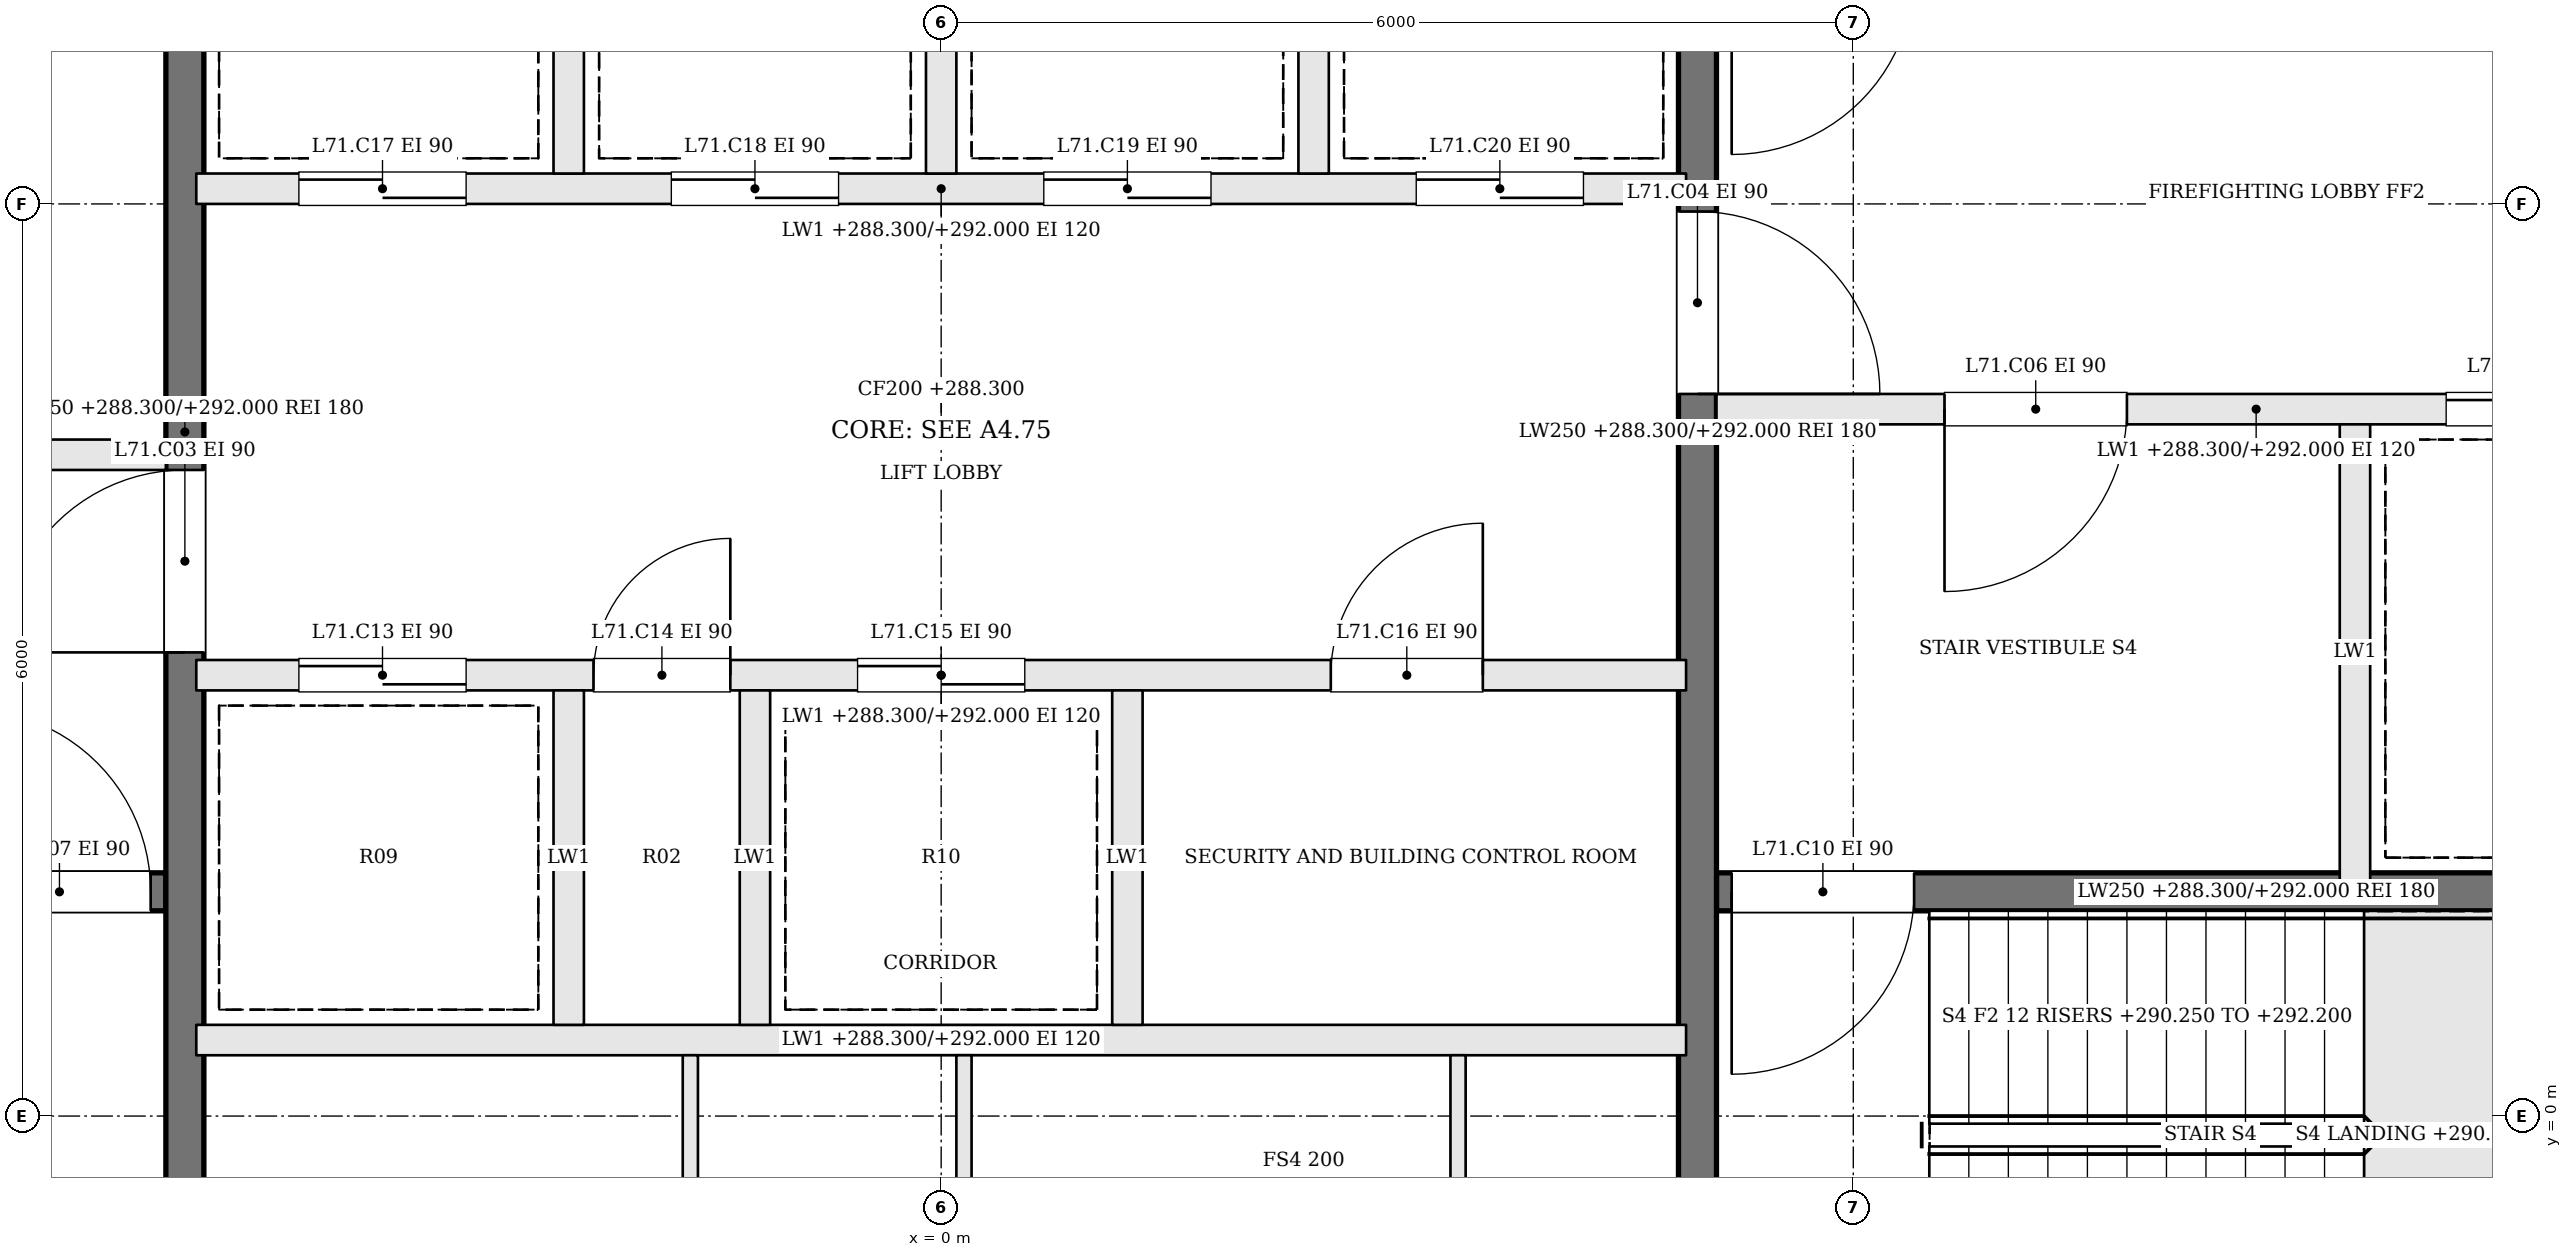
"""IFC4 building model, lengths in metres.
Left out: names, types, materials, properties, quantities, classifications, styles, units other than length and angle.
Written with IfcOpenShell. Run it as: python <this file> out.ifc"""

import sys

from ifc_helpers import new_model, si_unit, direction, frame, frame_2d, origin, place, context, subcontext, project, spatial, rectangle, extrude, element, fill, save


model = new_model("IFC4")
c1 = context("Model", 3, precision=1e-05, world=origin(), true_north=direction((0.0, 1.0)))
c2 = subcontext(c1, "Body", "Model", "MODEL_VIEW")
j1 = project(units=[si_unit("LENGTHUNIT", "METRE"), si_unit("PLANEANGLEUNIT", "RADIAN")], contexts=[c1])
p1 = place(None, origin())
s1 = spatial("IfcSite", under=j1, at=p1, CompositionType="ELEMENT")
p2 = place(p1, origin())
s2 = spatial("IfcBuilding", under=s1, at=p2, CompositionType="ELEMENT")
p3 = place(p2, frame((0.0, 0.0, 288.3)))
s3 = spatial("IfcBuildingStorey", under=s2, at=p3, CompositionType="ELEMENT", Elevation=288.3)
p4 = place(p3, frame((-12.2, 1.475, 0.0), z_axis=(0.0, 0.0, 1.0), x_axis=(1.0, 0.0, 0.0)))
e1 = element("IfcWall", 1, at=p4, inside=s3, PredefinedType="SOLIDWALL", context=c2, shape_type="SweptSolid", body=[
    extrude(rectangle(XDim=7.1, YDim=0.25, at=frame_2d((3.55, 0.0))), origin(), (0.0, 0.0, 1.0), 3.7),
])
p5 = place(p4, frame((5.8, 0.0, 0.0)))
e2 = element("IfcOpeningElement", 2, at=p5, cuts=e1, PredefinedType="OPENING", context=c2, shape_type="SweptSolid", body=[
    extrude(rectangle(XDim=1.2, YDim=2.1, at=frame_2d((0.6, 1.05))), frame((0.0, 0.135, 0.0), z_axis=(0.0, -1.0, 0.0), x_axis=(1.0, 0.0, 0.0)), (0.0, 0.0, 1.0), 0.27),
])
p6 = place(p3, frame((-12.2, 4.35, 0.0), z_axis=(0.0, 0.0, 1.0), x_axis=(1.0, 0.0, 0.0)))
e3 = element("IfcWall", 3, at=p6, inside=s3, PredefinedType="SOLIDWALL", context=c2, shape_type="SweptSolid", body=[
    extrude(rectangle(XDim=7.1, YDim=0.2, at=frame_2d((3.55, 0.0))), origin(), (0.0, 0.0, 1.0), 3.7),
])
p7 = place(p6, frame((4.4, 0.0, 0.0)))
e4 = element("IfcOpeningElement", 4, at=p7, cuts=e3, PredefinedType="OPENING", context=c2, shape_type="SweptSolid", body=[
    extrude(rectangle(XDim=1.2, YDim=2.1, at=frame_2d((0.6, 1.05))), frame((0.0, 0.11, 0.0), z_axis=(0.0, -1.0, 0.0), x_axis=(1.0, 0.0, 0.0)), (0.0, 0.0, 1.0), 0.22),
])
p8 = place(p6, frame((1.1, 0.0, 0.0)))
e5 = element("IfcOpeningElement", 5, at=p8, cuts=e3, PredefinedType="OPENING", context=c2, shape_type="SweptSolid", body=[
    extrude(rectangle(XDim=1.2, YDim=2.1, at=frame_2d((0.6, 1.05))), frame((0.0, 0.11, 0.0), z_axis=(0.0, -1.0, 0.0), x_axis=(1.0, 0.0, 0.0)), (0.0, 0.0, 1.0), 0.22),
])
p9 = place(p3, frame((12.2, 4.65, 0.0), z_axis=(0.0, 0.0, 1.0), x_axis=(-1.0, 0.0, 0.0)))
e6 = element("IfcWall", 6, at=p9, inside=s3, PredefinedType="SOLIDWALL", context=c2, shape_type="SweptSolid", body=[
    extrude(rectangle(XDim=7.1, YDim=0.2, at=frame_2d((3.55, 0.0))), origin(), (0.0, 0.0, 1.0), 3.7),
])
p10 = place(p9, frame((4.4, 0.0, 0.0)))
e7 = element("IfcOpeningElement", 7, at=p10, cuts=e6, PredefinedType="OPENING", context=c2, shape_type="SweptSolid", body=[
    extrude(rectangle(XDim=1.2, YDim=2.1, at=frame_2d((0.6, 1.05))), frame((0.0, 0.11, 0.0), z_axis=(0.0, -1.0, 0.0), x_axis=(1.0, 0.0, 0.0)), (0.0, 0.0, 1.0), 0.22),
])
p11 = place(p9, frame((1.1, 0.0, 0.0)))
e8 = element("IfcOpeningElement", 8, at=p11, cuts=e6, PredefinedType="OPENING", context=c2, shape_type="SweptSolid", body=[
    extrude(rectangle(XDim=1.2, YDim=2.1, at=frame_2d((0.6, 1.05))), frame((0.0, 0.11, 0.0), z_axis=(0.0, -1.0, 0.0), x_axis=(1.0, 0.0, 0.0)), (0.0, 0.0, 1.0), 0.22),
])
p12 = place(p3, frame((12.2, 1.475, 0.0), z_axis=(0.0, 0.0, 1.0), x_axis=(-1.0, 0.0, 0.0)))
e9 = element("IfcWall", 9, at=p12, inside=s3, PredefinedType="SOLIDWALL", context=c2, shape_type="SweptSolid", body=[
    extrude(rectangle(XDim=7.1, YDim=0.25, at=frame_2d((3.55, 0.0))), origin(), (0.0, 0.0, 1.0), 3.7),
])
p13 = place(p12, frame((5.8, 0.0, 0.0)))
e10 = element("IfcOpeningElement", 10, at=p13, cuts=e9, PredefinedType="OPENING", context=c2, shape_type="SweptSolid", body=[
    extrude(rectangle(XDim=1.2, YDim=2.1, at=frame_2d((0.6, 1.05))), frame((0.0, 0.135, 0.0), z_axis=(0.0, -1.0, 0.0), x_axis=(1.0, 0.0, 0.0)), (0.0, 0.0, 1.0), 0.27),
])
p14 = place(p3, frame((9.3, 4.55, 0.0), z_axis=(0.0, 0.0, 1.0), x_axis=(0.0, -1.0, 0.0)))
e11 = element("IfcWall", 11, at=p14, inside=s3, PredefinedType="SOLIDWALL", context=c2, shape_type="SweptSolid", body=[
    extrude(rectangle(XDim=3.0, YDim=0.2, at=frame_2d((1.5, 0.0))), origin(), (0.0, 0.0, 1.0), 3.7),
])
p15 = place(p3, frame((-4.975, -2.2, 0.0), z_axis=(0.0, 0.0, 1.0), x_axis=(0.0, 1.0, 0.0)))
e12 = element("IfcWall", 12, at=p15, inside=s3, PredefinedType="SOLIDWALL", context=c2, shape_type="SweptSolid", body=[
    extrude(rectangle(XDim=13.4, YDim=0.25, at=frame_2d((6.7, 0.0))), origin(), (0.0, 0.0, 1.0), 3.7),
])
p16 = place(p15, frame((5.25, 0.0, 0.0)))
e13 = element("IfcOpeningElement", 13, at=p16, cuts=e12, PredefinedType="OPENING", context=c2, shape_type="SweptSolid", body=[
    extrude(rectangle(XDim=1.2, YDim=2.1, at=frame_2d((0.6, 1.05))), frame((0.0, 0.135, 0.0), z_axis=(0.0, -1.0, 0.0), x_axis=(1.0, 0.0, 0.0)), (0.0, 0.0, 1.0), 0.27),
])
p17 = place(p3, frame((4.975, 11.2, 0.0), z_axis=(0.0, 0.0, 1.0), x_axis=(0.0, -1.0, 0.0)))
e14 = element("IfcWall", 14, at=p17, inside=s3, PredefinedType="SOLIDWALL", context=c2, shape_type="SweptSolid", body=[
    extrude(rectangle(XDim=13.4, YDim=0.25, at=frame_2d((6.7, 0.0))), origin(), (0.0, 0.0, 1.0), 3.7),
])
p18 = place(p17, frame((5.25, 0.0, 0.0)))
e15 = element("IfcOpeningElement", 15, at=p18, cuts=e14, PredefinedType="OPENING", context=c2, shape_type="SweptSolid", body=[
    extrude(rectangle(XDim=1.2, YDim=2.1, at=frame_2d((0.6, 1.05))), frame((0.0, 0.135, 0.0), z_axis=(0.0, -1.0, 0.0), x_axis=(1.0, 0.0, 0.0)), (0.0, 0.0, 1.0), 0.27),
])
p19 = place(p3, frame((-4.9, 0.5, 0.0), z_axis=(0.0, 0.0, 1.0), x_axis=(1.0, 0.0, 0.0)))
e16 = element("IfcWall", 16, at=p19, inside=s3, PredefinedType="SOLIDWALL", context=c2, shape_type="SweptSolid", body=[
    extrude(rectangle(XDim=9.8, YDim=0.2, at=frame_2d((4.9, 0.0))), origin(), (0.0, 0.0, 1.0), 3.7),
])
p20 = place(p3, frame((-4.9, 2.9, 0.0), z_axis=(0.0, 0.0, 1.0), x_axis=(1.0, 0.0, 0.0)))
e17 = element("IfcWall", 17, at=p20, inside=s3, PredefinedType="SOLIDWALL", context=c2, shape_type="SweptSolid", body=[
    extrude(rectangle(XDim=9.8, YDim=0.2, at=frame_2d((4.9, 0.0))), origin(), (0.0, 0.0, 1.0), 3.7),
])
p21 = place(p20, frame((0.675, 0.0, 0.0)))
e18 = element("IfcOpeningElement", 18, at=p21, cuts=e17, PredefinedType="OPENING", context=c2, shape_type="SweptSolid", body=[
    extrude(rectangle(XDim=1.1, YDim=2.1, at=frame_2d((0.55, 1.05))), frame((0.0, 0.11, 0.0), z_axis=(0.0, -1.0, 0.0), x_axis=(1.0, 0.0, 0.0)), (0.0, 0.0, 1.0), 0.22),
])
p22 = place(p20, frame((2.613, 0.0, 0.0)))
e19 = element("IfcOpeningElement", 19, at=p22, cuts=e17, PredefinedType="OPENING", context=c2, shape_type="SweptSolid", body=[
    extrude(rectangle(XDim=0.9, YDim=2.1, at=frame_2d((0.45, 1.05))), frame((0.0, 0.11, 0.0), z_axis=(0.0, -1.0, 0.0), x_axis=(1.0, 0.0, 0.0)), (0.0, 0.0, 1.0), 0.22),
])
p23 = place(p20, frame((4.35, 0.0, 0.0)))
e20 = element("IfcOpeningElement", 20, at=p23, cuts=e17, PredefinedType="OPENING", context=c2, shape_type="SweptSolid", body=[
    extrude(rectangle(XDim=1.1, YDim=2.1, at=frame_2d((0.55, 1.05))), frame((0.0, 0.11, 0.0), z_axis=(0.0, -1.0, 0.0), x_axis=(1.0, 0.0, 0.0)), (0.0, 0.0, 1.0), 0.22),
])
p24 = place(p20, frame((7.463, 0.0, 0.0)))
e21 = element("IfcOpeningElement", 21, at=p24, cuts=e17, PredefinedType="OPENING", context=c2, shape_type="SweptSolid", body=[
    extrude(rectangle(XDim=1.0, YDim=2.1, at=frame_2d((0.5, 1.05))), frame((0.0, 0.11, 0.0), z_axis=(0.0, -1.0, 0.0), x_axis=(1.0, 0.0, 0.0)), (0.0, 0.0, 1.0), 0.22),
])
p25 = place(p3, frame((-4.9, 6.1, 0.0), z_axis=(0.0, 0.0, 1.0), x_axis=(1.0, 0.0, 0.0)))
e22 = element("IfcWall", 22, at=p25, inside=s3, PredefinedType="SOLIDWALL", context=c2, shape_type="SweptSolid", body=[
    extrude(rectangle(XDim=9.8, YDim=0.2, at=frame_2d((4.9, 0.0))), origin(), (0.0, 0.0, 1.0), 3.7),
])
p26 = place(p25, frame((0.675, 0.0, 0.0)))
e23 = element("IfcOpeningElement", 23, at=p26, cuts=e22, PredefinedType="OPENING", context=c2, shape_type="SweptSolid", body=[
    extrude(rectangle(XDim=1.1, YDim=2.1, at=frame_2d((0.55, 1.05))), frame((0.0, 0.11, 0.0), z_axis=(0.0, -1.0, 0.0), x_axis=(1.0, 0.0, 0.0)), (0.0, 0.0, 1.0), 0.22),
])
p27 = place(p25, frame((3.125, 0.0, 0.0)))
e24 = element("IfcOpeningElement", 24, at=p27, cuts=e22, PredefinedType="OPENING", context=c2, shape_type="SweptSolid", body=[
    extrude(rectangle(XDim=1.1, YDim=2.1, at=frame_2d((0.55, 1.05))), frame((0.0, 0.11, 0.0), z_axis=(0.0, -1.0, 0.0), x_axis=(1.0, 0.0, 0.0)), (0.0, 0.0, 1.0), 0.22),
])
p28 = place(p25, frame((5.575, 0.0, 0.0)))
e25 = element("IfcOpeningElement", 25, at=p28, cuts=e22, PredefinedType="OPENING", context=c2, shape_type="SweptSolid", body=[
    extrude(rectangle(XDim=1.1, YDim=2.1, at=frame_2d((0.55, 1.05))), frame((0.0, 0.11, 0.0), z_axis=(0.0, -1.0, 0.0), x_axis=(1.0, 0.0, 0.0)), (0.0, 0.0, 1.0), 0.22),
])
p29 = place(p25, frame((8.025, 0.0, 0.0)))
e26 = element("IfcOpeningElement", 26, at=p29, cuts=e22, PredefinedType="OPENING", context=c2, shape_type="SweptSolid", body=[
    extrude(rectangle(XDim=1.1, YDim=2.1, at=frame_2d((0.55, 1.05))), frame((0.0, 0.11, 0.0), z_axis=(0.0, -1.0, 0.0), x_axis=(1.0, 0.0, 0.0)), (0.0, 0.0, 1.0), 0.22),
])
for number, where, z_axis, x_axis in (
    (27, (-2.45, 0.6, 0.0), (0.0, 0.0, 1.0), (0.0, 1.0, 0.0)),
    (28, (-1.225, 0.6, 0.0), (0.0, 0.0, 1.0), (0.0, 1.0, 0.0)),
    (29, (1.225, 0.6, 0.0), (0.0, 0.0, 1.0), (0.0, 1.0, 0.0)),
    (30, (-2.45, 6.2, 0.0), (0.0, 0.0, 1.0), (0.0, 1.0, 0.0)),
    (31, (0.0, 6.2, 0.0), (0.0, 0.0, 1.0), (0.0, 1.0, 0.0)),
    (32, (2.45, 6.2, 0.0), (0.0, 0.0, 1.0), (0.0, 1.0, 0.0)),
):
    element("IfcWall", number, at=place(p3, frame(where, z_axis=z_axis, x_axis=x_axis)), inside=s3, PredefinedType="SOLIDWALL", context=c2, shape_type="SweptSolid", body=[
        extrude(rectangle(XDim=2.2, YDim=0.2, at=frame_2d((1.1, 0.0))), origin(), (0.0, 0.0, 1.0), 3.7),
    ])
for number, where, z_axis, x_axis in (
    (33, (-1.65, -2.2, 0.0), (0.0, 0.0, 1.0), (0.0, 1.0, 0.0)),
    (34, (0.15, -2.2, 0.0), (0.0, 0.0, 1.0), (0.0, 1.0, 0.0)),
    (35, (3.4, -2.2, 0.0), (0.0, 0.0, 1.0), (0.0, 1.0, 0.0)),
):
    element("IfcWall", number, at=place(p3, frame(where, z_axis=z_axis, x_axis=x_axis)), inside=s3, PredefinedType="PARTITIONING", context=c2, shape_type="SweptSolid", body=[
        extrude(rectangle(XDim=2.6, YDim=0.1, at=frame_2d((1.3, 0.0))), origin(), (0.0, 0.0, 1.0), 3.7),
    ])
p30 = place(p16, origin())
e36 = element("IfcDoor", 36, at=p30, inside=s3, OperationType="SINGLE_SWING_LEFT", PredefinedType="DOOR", context=c2, shape_type="SweptSolid", body=[
    extrude(rectangle(XDim=1.2, YDim=2.1, at=frame_2d((0.6, 1.05))), frame((0.0, 0.025, 0.0), z_axis=(0.0, -1.0, 0.0), x_axis=(1.0, 0.0, 0.0)), (0.0, 0.0, 1.0), 0.05),
])
fill(e13, e36)
p31 = place(p18, origin())
e37 = element("IfcDoor", 37, at=p31, inside=s3, OperationType="SINGLE_SWING_RIGHT", PredefinedType="DOOR", context=c2, shape_type="SweptSolid", body=[
    extrude(rectangle(XDim=1.2, YDim=2.1, at=frame_2d((0.6, 1.05))), frame((0.0, 0.025, 0.0), z_axis=(0.0, -1.0, 0.0), x_axis=(1.0, 0.0, 0.0)), (0.0, 0.0, 1.0), 0.05),
])
fill(e15, e37)
p32 = place(p10, origin())
e38 = element("IfcDoor", 38, at=p32, inside=s3, OperationType="SINGLE_SWING_RIGHT", PredefinedType="DOOR", context=c2, shape_type="SweptSolid", body=[
    extrude(rectangle(XDim=1.2, YDim=2.1, at=frame_2d((0.6, 1.05))), frame((0.0, 0.025, 0.0), z_axis=(0.0, -1.0, 0.0), x_axis=(1.0, 0.0, 0.0)), (0.0, 0.0, 1.0), 0.05),
])
fill(e7, e38)
p33 = place(p5, origin())
e39 = element("IfcDoor", 39, at=p33, inside=s3, OperationType="SINGLE_SWING_LEFT", PredefinedType="DOOR", context=c2, shape_type="SweptSolid", body=[
    extrude(rectangle(XDim=1.2, YDim=2.1, at=frame_2d((0.6, 1.05))), frame((0.0, 0.025, 0.0), z_axis=(0.0, -1.0, 0.0), x_axis=(1.0, 0.0, 0.0)), (0.0, 0.0, 1.0), 0.05),
])
fill(e2, e39)
p34 = place(p13, origin())
e40 = element("IfcDoor", 40, at=p34, inside=s3, OperationType="SINGLE_SWING_RIGHT", PredefinedType="DOOR", context=c2, shape_type="SweptSolid", body=[
    extrude(rectangle(XDim=1.2, YDim=2.1, at=frame_2d((0.6, 1.05))), frame((0.0, 0.025, 0.0), z_axis=(0.0, -1.0, 0.0), x_axis=(1.0, 0.0, 0.0)), (0.0, 0.0, 1.0), 0.05),
])
fill(e10, e40)
p35 = place(p11, origin())
e41 = element("IfcDoor", 41, at=p35, inside=s3, OperationType="SLIDING_TO_RIGHT", PredefinedType="DOOR", context=c2, shape_type="SweptSolid", body=[
    extrude(rectangle(XDim=1.2, YDim=2.1, at=frame_2d((0.6, 1.05))), frame((0.0, 0.025, 0.0), z_axis=(0.0, -1.0, 0.0), x_axis=(1.0, 0.0, 0.0)), (0.0, 0.0, 1.0), 0.05),
])
fill(e8, e41)
p36 = place(p21, origin())
e42 = element("IfcDoor", 42, at=p36, inside=s3, OperationType="SLIDING_TO_RIGHT", PredefinedType="DOOR", context=c2, shape_type="SweptSolid", body=[
    extrude(rectangle(XDim=1.1, YDim=2.1, at=frame_2d((0.55, 1.05))), frame((0.0, 0.025, 0.0), z_axis=(0.0, -1.0, 0.0), x_axis=(1.0, 0.0, 0.0)), (0.0, 0.0, 1.0), 0.05),
])
fill(e18, e42)
p37 = place(p22, origin())
e43 = element("IfcDoor", 43, at=p37, inside=s3, OperationType="SINGLE_SWING_RIGHT", PredefinedType="DOOR", context=c2, shape_type="SweptSolid", body=[
    extrude(rectangle(XDim=0.9, YDim=2.1, at=frame_2d((0.45, 1.05))), frame((0.0, 0.025, 0.0), z_axis=(0.0, -1.0, 0.0), x_axis=(1.0, 0.0, 0.0)), (0.0, 0.0, 1.0), 0.05),
])
fill(e19, e43)
p38 = place(p23, origin())
e44 = element("IfcDoor", 44, at=p38, inside=s3, OperationType="SLIDING_TO_LEFT", PredefinedType="DOOR", context=c2, shape_type="SweptSolid", body=[
    extrude(rectangle(XDim=1.1, YDim=2.1, at=frame_2d((0.55, 1.05))), frame((0.0, 0.025, 0.0), z_axis=(0.0, -1.0, 0.0), x_axis=(1.0, 0.0, 0.0)), (0.0, 0.0, 1.0), 0.05),
])
fill(e20, e44)
p39 = place(p24, origin())
e45 = element("IfcDoor", 45, at=p39, inside=s3, OperationType="SINGLE_SWING_RIGHT", PredefinedType="DOOR", context=c2, shape_type="SweptSolid", body=[
    extrude(rectangle(XDim=1.0, YDim=2.1, at=frame_2d((0.5, 1.05))), frame((0.0, 0.025, 0.0), z_axis=(0.0, -1.0, 0.0), x_axis=(1.0, 0.0, 0.0)), (0.0, 0.0, 1.0), 0.05),
])
fill(e21, e45)
p40 = place(p26, origin())
e46 = element("IfcDoor", 46, at=p40, inside=s3, OperationType="SLIDING_TO_RIGHT", PredefinedType="DOOR", context=c2, shape_type="SweptSolid", body=[
    extrude(rectangle(XDim=1.1, YDim=2.1, at=frame_2d((0.55, 1.05))), frame((0.0, 0.025, 0.0), z_axis=(0.0, -1.0, 0.0), x_axis=(1.0, 0.0, 0.0)), (0.0, 0.0, 1.0), 0.05),
])
fill(e23, e46)
p41 = place(p27, origin())
e47 = element("IfcDoor", 47, at=p41, inside=s3, OperationType="SLIDING_TO_LEFT", PredefinedType="DOOR", context=c2, shape_type="SweptSolid", body=[
    extrude(rectangle(XDim=1.1, YDim=2.1, at=frame_2d((0.55, 1.05))), frame((0.0, 0.025, 0.0), z_axis=(0.0, -1.0, 0.0), x_axis=(1.0, 0.0, 0.0)), (0.0, 0.0, 1.0), 0.05),
])
fill(e24, e47)
p42 = place(p28, origin())
e48 = element("IfcDoor", 48, at=p42, inside=s3, OperationType="SLIDING_TO_RIGHT", PredefinedType="DOOR", context=c2, shape_type="SweptSolid", body=[
    extrude(rectangle(XDim=1.1, YDim=2.1, at=frame_2d((0.55, 1.05))), frame((0.0, 0.025, 0.0), z_axis=(0.0, -1.0, 0.0), x_axis=(1.0, 0.0, 0.0)), (0.0, 0.0, 1.0), 0.05),
])
fill(e25, e48)
p43 = place(p29, origin())
e49 = element("IfcDoor", 49, at=p43, inside=s3, OperationType="SLIDING_TO_LEFT", PredefinedType="DOOR", context=c2, shape_type="SweptSolid", body=[
    extrude(rectangle(XDim=1.1, YDim=2.1, at=frame_2d((0.55, 1.05))), frame((0.0, 0.025, 0.0), z_axis=(0.0, -1.0, 0.0), x_axis=(1.0, 0.0, 0.0)), (0.0, 0.0, 1.0), 0.05),
])
fill(e26, e49)
save(model, sys.argv[1])
